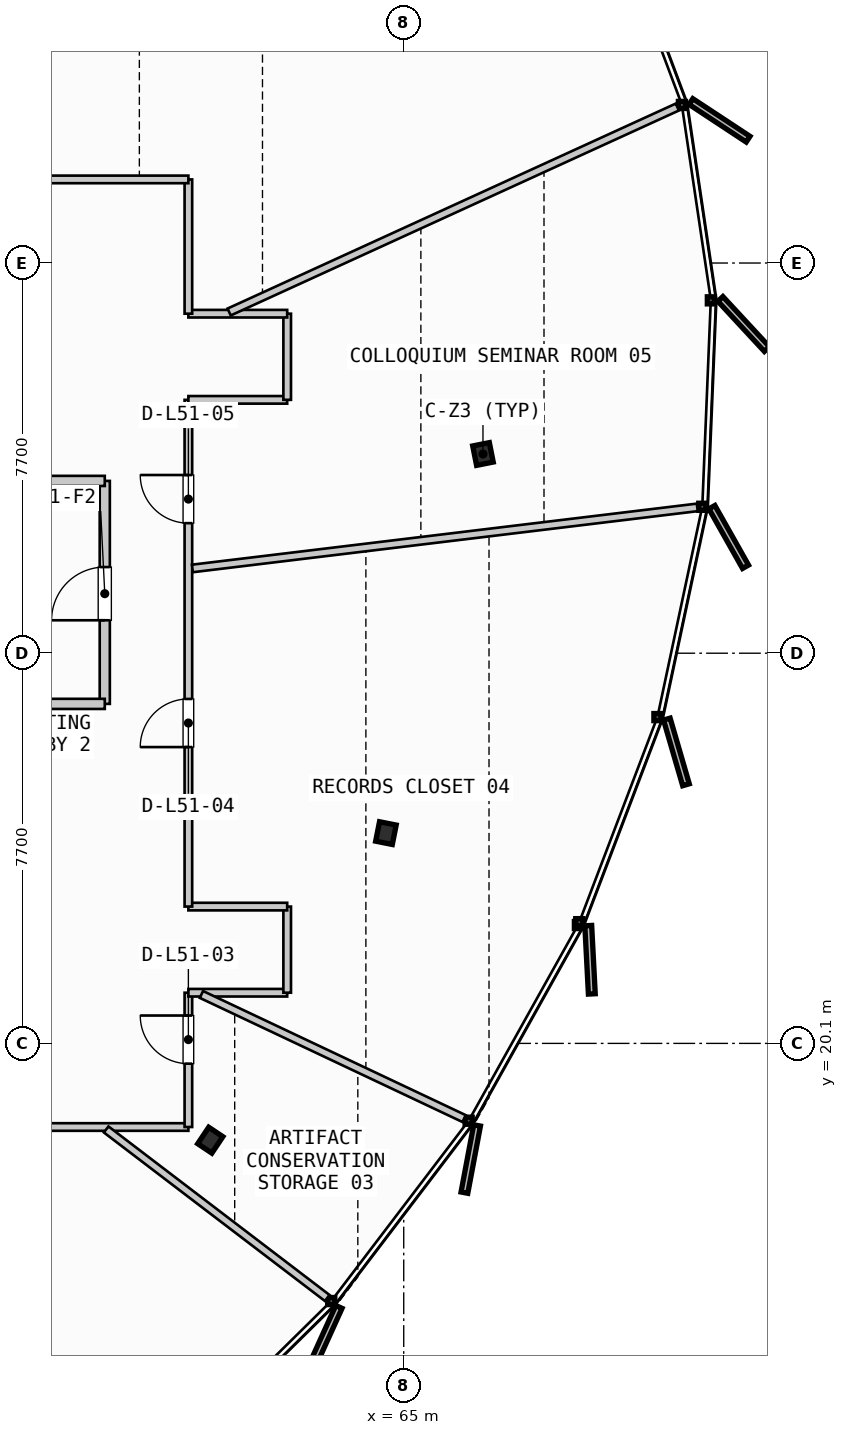
"""IFC4 building model, lengths in metres.
Left out: names, types, materials, properties, quantities, classifications, styles, units other than length and angle.
Written with IfcOpenShell. Run it as: python <this file> out.ifc"""

import sys

from ifc_helpers import new_model, si_unit, direction, frame, frame_2d, origin, origin_2d, place, context, subcontext, project, spatial, rectangle, i_section, extrude, source, transform, mapped, element, fill, save


model = new_model("IFC4")
c1 = context("Model", 3, precision=1e-05, world=origin(), true_north=direction((0.0, 1.0)))
c2 = subcontext(c1, "Body", "Model", "MODEL_VIEW")
j1 = project(units=[si_unit("LENGTHUNIT", "METRE"), si_unit("PLANEANGLEUNIT", "RADIAN")], contexts=[c1])
p1 = place(None, origin())
s1 = spatial("IfcSite", under=j1, at=p1, CompositionType="ELEMENT")
p2 = place(p1, origin())
s2 = spatial("IfcBuilding", under=s1, at=p2, CompositionType="ELEMENT")
p3 = place(p2, frame((0.0, 0.0, 197.4)))
s3 = spatial("IfcBuildingStorey", under=s2, at=p3, CompositionType="ELEMENT", Elevation=197.4)
m1 = source(origin(), c2, "Body", "SweptSolid", [
    extrude(i_section(OverallWidth=0.391, OverallDepth=0.335, WebThickness=0.023, FlangeThickness=0.034, FilletRadius=0.015, at=origin_2d()), origin(), (0.0, 0.0, 1.0), 3.26),
])
for number, where, z_axis, x_axis in (
    (1, (66.564, 31.731, 0.0), (0.0, 0.0, 1.0), (0.981, 0.195, 0.0)),
    (2, (61.183, 18.19, 0.0), (0.0, 0.0, 1.0), (0.831, -0.556, 0.0)),
    (3, (64.649, 24.25, 0.0), (0.0, 0.0, 1.0), (0.981, -0.195, 0.0)),
):
    element("IfcColumn", number, at=place(p3, frame(where, z_axis=z_axis, x_axis=x_axis)), inside=s3, PredefinedType="COLUMN", context=c2, shape_type="MappedRepresentation", body=[
        mapped(m1, transform((0.0, 0.0, 0.0), scale=1.0)),
    ])
p4 = place(p3, frame((59.1, 26.8, 0.0), z_axis=(0.0, 0.0, 1.0), x_axis=(0.0, 1.0, 0.0)))
e4 = element("IfcWall", 4, at=p4, inside=s3, PredefinedType="PARTITIONING", context=c2, shape_type="SweptSolid", body=[
    extrude(rectangle(XDim=4.4, YDim=0.2, at=frame_2d((2.2, 0.0))), origin(), (0.0, 0.0, 1.0), 2.595),
])
p5 = place(p4, frame((1.65, 0.0, 0.0)))
e5 = element("IfcOpeningElement", 5, at=p5, cuts=e4, PredefinedType="OPENING", context=c2, shape_type="SweptSolid", body=[
    extrude(rectangle(XDim=1.05, YDim=2.15, at=frame_2d((0.525, 1.075))), frame((0.0, 0.11, 0.0), z_axis=(0.0, -1.0, 0.0), x_axis=(1.0, 0.0, 0.0)), (0.0, 0.0, 1.0), 0.22),
])
for number, where, z_axis, x_axis in (
    (6, (55.885, 26.8, 0.0), (0.0, 0.0, 1.0), (1.0, 0.0, 0.0)),
    (7, (55.885, 31.2, 0.0), (0.0, 0.0, 1.0), (1.0, 0.0, 0.0)),
):
    element("IfcWall", number, at=place(p3, frame(where, z_axis=z_axis, x_axis=x_axis)), inside=s3, PredefinedType="PARTITIONING", context=c2, shape_type="SweptSolid", body=[
        extrude(rectangle(XDim=3.215, YDim=0.2, at=frame_2d((1.607, 0.0))), origin(), (0.0, 0.0, 1.0), 2.595),
    ])
p6 = place(p3, frame((32.4, 18.45, 0.0), z_axis=(0.0, 0.0, 1.0), x_axis=(1.0, 0.0, 0.0)))
e8 = element("IfcWall", 8, at=p6, inside=s3, PredefinedType="PARTITIONING", context=c2, shape_type="SweptSolid", body=[
    extrude(rectangle(XDim=28.35, YDim=0.15, at=frame_2d((14.175, 0.0))), origin(), (0.0, 0.0, 1.0), 2.595),
])
p7 = place(p6, frame((6.592, 0.0, 0.0)))
e9 = element("IfcOpeningElement", 9, at=p7, cuts=e8, PredefinedType="OPENING", context=c2, shape_type="SweptSolid", body=[
    extrude(rectangle(XDim=0.95, YDim=2.15, at=frame_2d((0.475, 1.075))), frame((0.0, 0.085, 0.0), z_axis=(0.0, -1.0, 0.0), x_axis=(1.0, 0.0, 0.0)), (0.0, 0.0, 1.0), 0.17),
])
p8 = place(p6, frame((19.725, 0.0, 0.0)))
e10 = element("IfcOpeningElement", 10, at=p8, cuts=e8, PredefinedType="OPENING", context=c2, shape_type="SweptSolid", body=[
    extrude(rectangle(XDim=0.95, YDim=2.15, at=frame_2d((0.475, 1.075))), frame((0.0, 0.085, 0.0), z_axis=(0.0, -1.0, 0.0), x_axis=(1.0, 0.0, 0.0)), (0.0, 0.0, 1.0), 0.17),
])
p9 = place(p3, frame((60.75, 18.45, 0.0), z_axis=(0.0, 0.0, 1.0), x_axis=(0.0, 1.0, 0.0)))
e11 = element("IfcWall", 11, at=p9, inside=s3, PredefinedType="PARTITIONING", context=c2, shape_type="SweptSolid", body=[
    extrude(rectangle(XDim=2.65, YDim=0.15, at=frame_2d((1.325, 0.0))), origin(), (0.0, 0.0, 1.0), 2.595),
])
p10 = place(p9, frame((1.25, 0.0, 0.0)))
e12 = element("IfcOpeningElement", 12, at=p10, cuts=e11, PredefinedType="OPENING", context=c2, shape_type="SweptSolid", body=[
    extrude(rectangle(XDim=0.95, YDim=2.15, at=frame_2d((0.475, 1.075))), frame((0.0, 0.085, 0.0), z_axis=(0.0, -1.0, 0.0), x_axis=(1.0, 0.0, 0.0)), (0.0, 0.0, 1.0), 0.17),
])
p11 = place(p3, frame((60.75, 21.1, 0.0), z_axis=(0.0, 0.0, 1.0), x_axis=(1.0, 0.0, 0.0)))
e13 = element("IfcWall", 13, at=p11, inside=s3, PredefinedType="PARTITIONING", context=c2, shape_type="SweptSolid", body=[
    extrude(rectangle(XDim=1.95, YDim=0.15, at=frame_2d((0.975, 0.0))), origin(), (0.0, 0.0, 1.0), 2.595),
])
p12 = place(p3, frame((62.7, 21.1, 0.0), z_axis=(0.0, 0.0, 1.0), x_axis=(0.0, 1.0, 0.0)))
e14 = element("IfcWall", 14, at=p12, inside=s3, PredefinedType="PARTITIONING", context=c2, shape_type="SweptSolid", body=[
    extrude(rectangle(XDim=1.7, YDim=0.15, at=frame_2d((0.85, 0.0))), origin(), (0.0, 0.0, 1.0), 2.595),
])
p13 = place(p3, frame((62.7, 22.8, 0.0), z_axis=(0.0, 0.0, 1.0), x_axis=(-1.0, 0.0, 0.0)))
e15 = element("IfcWall", 15, at=p13, inside=s3, PredefinedType="PARTITIONING", context=c2, shape_type="SweptSolid", body=[
    extrude(rectangle(XDim=1.95, YDim=0.15, at=frame_2d((0.975, 0.0))), origin(), (0.0, 0.0, 1.0), 2.595),
])
p14 = place(p3, frame((60.75, 22.8, 0.0), z_axis=(0.0, 0.0, 1.0), x_axis=(0.0, 1.0, 0.0)))
e16 = element("IfcWall", 16, at=p14, inside=s3, PredefinedType="PARTITIONING", context=c2, shape_type="SweptSolid", body=[
    extrude(rectangle(XDim=10.0, YDim=0.15, at=frame_2d((5.0, 0.0))), origin(), (0.0, 0.0, 1.0), 2.595),
])
p15 = place(p14, frame((3.147, 0.0, 0.0)))
e17 = element("IfcOpeningElement", 17, at=p15, cuts=e16, PredefinedType="OPENING", context=c2, shape_type="SweptSolid", body=[
    extrude(rectangle(XDim=0.95, YDim=2.15, at=frame_2d((0.475, 1.075))), frame((0.0, 0.085, 0.0), z_axis=(0.0, -1.0, 0.0), x_axis=(1.0, 0.0, 0.0)), (0.0, 0.0, 1.0), 0.17),
])
p16 = place(p14, frame((7.567, 0.0, 0.0)))
e18 = element("IfcOpeningElement", 18, at=p16, cuts=e16, PredefinedType="OPENING", context=c2, shape_type="SweptSolid", body=[
    extrude(rectangle(XDim=0.95, YDim=2.15, at=frame_2d((0.475, 1.075))), frame((0.0, 0.085, 0.0), z_axis=(0.0, -1.0, 0.0), x_axis=(1.0, 0.0, 0.0)), (0.0, 0.0, 1.0), 0.17),
])
p17 = place(p3, frame((60.75, 32.8, 0.0), z_axis=(0.0, 0.0, 1.0), x_axis=(1.0, 0.0, 0.0)))
e19 = element("IfcWall", 19, at=p17, inside=s3, PredefinedType="PARTITIONING", context=c2, shape_type="SweptSolid", body=[
    extrude(rectangle(XDim=1.95, YDim=0.15, at=frame_2d((0.975, 0.0))), origin(), (0.0, 0.0, 1.0), 2.595),
])
p18 = place(p3, frame((62.7, 32.8, 0.0), z_axis=(0.0, 0.0, 1.0), x_axis=(0.0, 1.0, 0.0)))
e20 = element("IfcWall", 20, at=p18, inside=s3, PredefinedType="PARTITIONING", context=c2, shape_type="SweptSolid", body=[
    extrude(rectangle(XDim=1.7, YDim=0.15, at=frame_2d((0.85, 0.0))), origin(), (0.0, 0.0, 1.0), 2.595),
])
p19 = place(p3, frame((62.7, 34.5, 0.0), z_axis=(0.0, 0.0, 1.0), x_axis=(-1.0, 0.0, 0.0)))
e21 = element("IfcWall", 21, at=p19, inside=s3, PredefinedType="PARTITIONING", context=c2, shape_type="SweptSolid", body=[
    extrude(rectangle(XDim=1.95, YDim=0.15, at=frame_2d((0.975, 0.0))), origin(), (0.0, 0.0, 1.0), 2.595),
])
p20 = place(p3, frame((60.75, 34.5, 0.0), z_axis=(0.0, 0.0, 1.0), x_axis=(0.0, 1.0, 0.0)))
e22 = element("IfcWall", 22, at=p20, inside=s3, PredefinedType="PARTITIONING", context=c2, shape_type="SweptSolid", body=[
    extrude(rectangle(XDim=2.65, YDim=0.15, at=frame_2d((1.325, 0.0))), origin(), (0.0, 0.0, 1.0), 2.595),
])
p21 = place(p3, frame((60.75, 37.15, 0.0), z_axis=(0.0, 0.0, 1.0), x_axis=(-1.0, 0.0, 0.0)))
e23 = element("IfcWall", 23, at=p21, inside=s3, PredefinedType="PARTITIONING", context=c2, shape_type="SweptSolid", body=[
    extrude(rectangle(XDim=28.35, YDim=0.15, at=frame_2d((14.175, 0.0))), origin(), (0.0, 0.0, 1.0), 2.595),
])
p22 = place(p21, frame((4.612, 0.0, 0.0)))
e24 = element("IfcOpeningElement", 24, at=p22, cuts=e23, PredefinedType="OPENING", context=c2, shape_type="SweptSolid", body=[
    extrude(rectangle(XDim=0.95, YDim=2.15, at=frame_2d((0.475, 1.075))), frame((0.0, 0.085, 0.0), z_axis=(0.0, -1.0, 0.0), x_axis=(1.0, 0.0, 0.0)), (0.0, 0.0, 1.0), 0.17),
])
p23 = place(p21, frame((10.803, 0.0, 0.0)))
e25 = element("IfcOpeningElement", 25, at=p23, cuts=e23, PredefinedType="OPENING", context=c2, shape_type="SweptSolid", body=[
    extrude(rectangle(XDim=0.95, YDim=2.15, at=frame_2d((0.475, 1.075))), frame((0.0, 0.085, 0.0), z_axis=(0.0, -1.0, 0.0), x_axis=(1.0, 0.0, 0.0)), (0.0, 0.0, 1.0), 0.17),
])
p24 = place(p21, frame((15.534, 0.0, 0.0)))
e26 = element("IfcOpeningElement", 26, at=p24, cuts=e23, PredefinedType="OPENING", context=c2, shape_type="SweptSolid", body=[
    extrude(rectangle(XDim=0.95, YDim=2.15, at=frame_2d((0.475, 1.075))), frame((0.0, 0.085, 0.0), z_axis=(0.0, -1.0, 0.0), x_axis=(1.0, 0.0, 0.0)), (0.0, 0.0, 1.0), 0.17),
])
p25 = place(p21, frame((22.208, 0.0, 0.0)))
e27 = element("IfcOpeningElement", 27, at=p25, cuts=e23, PredefinedType="OPENING", context=c2, shape_type="SweptSolid", body=[
    extrude(rectangle(XDim=0.95, YDim=2.15, at=frame_2d((0.475, 1.075))), frame((0.0, 0.085, 0.0), z_axis=(0.0, -1.0, 0.0), x_axis=(1.0, 0.0, 0.0)), (0.0, 0.0, 1.0), 0.17),
])
p26 = place(p3, frame((59.128, 18.402, 0.0), z_axis=(0.0, 0.0, 1.0), x_axis=(0.795248813588, -0.606283204853, 0.0)))
e28 = element("IfcWall", 28, at=p26, inside=s3, PredefinedType="PARTITIONING", context=c2, shape_type="SweptSolid", body=[
    extrude(rectangle(XDim=5.486, YDim=0.15, at=frame_2d((2.743, 0.0))), origin(), (0.0, 0.0, 1.0), 2.595),
])
p27 = place(p3, frame((61.007, 21.066, 0.0), z_axis=(0.0, 0.0, 1.0), x_axis=(0.904144945531, -0.427225838954, 0.0)))
e29 = element("IfcWall", 29, at=p27, inside=s3, PredefinedType="PARTITIONING", context=c2, shape_type="SweptSolid", body=[
    extrude(rectangle(XDim=5.733, YDim=0.15, at=frame_2d((2.867, 0.0))), origin(), (0.0, 0.0, 1.0), 2.595),
])
p28 = place(p3, frame((60.829, 29.473, 0.0), z_axis=(0.0, 0.0, 1.0), x_axis=(0.992768346893, 0.120045863764, 0.0)))
e30 = element("IfcWall", 30, at=p28, inside=s3, PredefinedType="PARTITIONING", context=c2, shape_type="SweptSolid", body=[
    extrude(rectangle(XDim=10.036, YDim=0.15, at=frame_2d((5.018, 0.0))), origin(), (0.0, 0.0, 1.0), 2.595),
])
p29 = place(p3, frame((61.554, 34.533, 0.0), z_axis=(0.0, 0.0, 1.0), x_axis=(0.909424572648, 0.415868905623, 0.0)))
e31 = element("IfcWall", 31, at=p29, inside=s3, PredefinedType="PARTITIONING", context=c2, shape_type="SweptSolid", body=[
    extrude(rectangle(XDim=9.726, YDim=0.15, at=frame_2d((4.863, 0.0))), origin(), (0.0, 0.0, 1.0), 2.595),
])
m2 = source(origin(), c2, "Body", "SweptSolid", [
    extrude(rectangle(XDim=1.05, YDim=2.15, at=frame_2d((0.525, 1.075))), frame((0.0, 0.025, 0.0), z_axis=(0.0, -1.0, 0.0), x_axis=(1.0, 0.0, 0.0)), (0.0, 0.0, 1.0), 0.05),
])
p30 = place(p5, origin())
e32 = element("IfcDoor", 32, at=p30, inside=s3, OperationType="SINGLE_SWING_LEFT", PredefinedType="DOOR", context=c2, shape_type="MappedRepresentation", body=[
    mapped(m2, transform((0.0, 0.0, 0.0), scale=1.0)),
])
fill(e5, e32)
m3 = source(origin(), c2, "Body", "SweptSolid", [
    extrude(rectangle(XDim=0.95, YDim=2.15, at=frame_2d((0.475, 1.075))), frame((0.0, 0.025, 0.0), z_axis=(0.0, -1.0, 0.0), x_axis=(1.0, 0.0, 0.0)), (0.0, 0.0, 1.0), 0.05),
])
p31 = place(p10, origin())
e33 = element("IfcDoor", 33, at=p31, inside=s3, OperationType="SINGLE_SWING_RIGHT", PredefinedType="DOOR", context=c2, shape_type="MappedRepresentation", body=[
    mapped(m3, transform((0.0, 0.0, 0.0), scale=1.0)),
])
fill(e12, e33)
p32 = place(p15, origin())
e34 = element("IfcDoor", 34, at=p32, inside=s3, OperationType="SINGLE_SWING_LEFT", PredefinedType="DOOR", context=c2, shape_type="MappedRepresentation", body=[
    mapped(m3, transform((0.0, 0.0, 0.0), scale=1.0)),
])
fill(e17, e34)
p33 = place(p16, origin())
e35 = element("IfcDoor", 35, at=p33, inside=s3, OperationType="SINGLE_SWING_RIGHT", PredefinedType="DOOR", context=c2, shape_type="MappedRepresentation", body=[
    mapped(m3, transform((0.0, 0.0, 0.0), scale=1.0)),
])
fill(e18, e35)
save(model, sys.argv[1])
